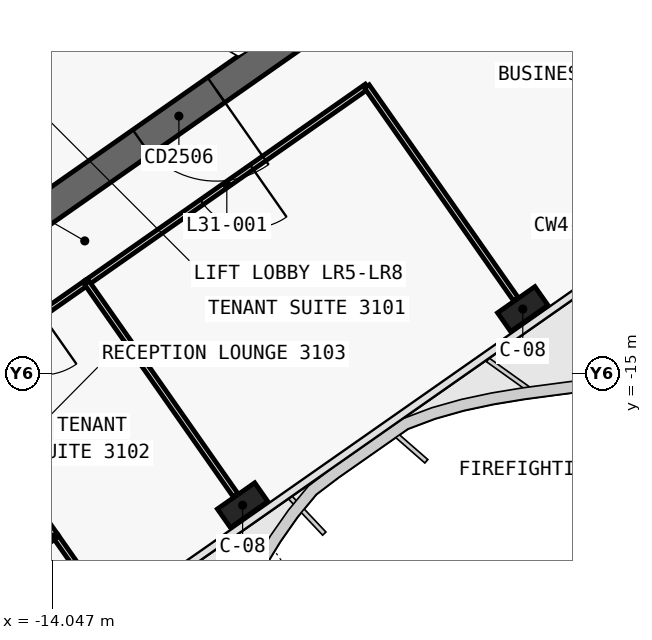
"""IFC4 building model, lengths in metres.
Left out: names, types, materials, properties, quantities, classifications, styles, units other than length and angle.
Written with IfcOpenShell. Run it as: python <this file> out.ifc"""

import sys

from ifc_helpers import new_model, si_unit, direction, frame, frame_2d, origin, origin_2d, place, context, subcontext, project, spatial, polyline, rectangle, outline, extrude, element, fill, save


model = new_model("IFC4")
c1 = context("Model", 3, precision=1e-05, world=origin(), true_north=direction((0.0, 1.0)))
c2 = subcontext(c1, "Body", "Model", "MODEL_VIEW")
j1 = project(units=[si_unit("LENGTHUNIT", "METRE"), si_unit("PLANEANGLEUNIT", "RADIAN")], contexts=[c1])
p1 = place(None, origin())
s1 = spatial("IfcSite", under=j1, at=p1, CompositionType="ELEMENT")
p2 = place(p1, origin())
s2 = spatial("IfcBuilding", under=s1, at=p2, CompositionType="ELEMENT")
p3 = place(p2, frame((0.0, 0.0, 139.8)))
s3 = spatial("IfcBuildingStorey", under=s2, at=p3, CompositionType="ELEMENT", Elevation=139.8)
p4 = place(p3, frame((0.029, 11.984, 0.0), z_axis=(0.0, 0.0, 1.0), x_axis=(-0.819151382952, -0.573577380837, 0.0)))
e1 = element("IfcWall", 1, at=p4, inside=s3, PredefinedType="SHEAR", context=c2, shape_type="SweptSolid", body=[
    extrude(outline(polyline([(33.898, 0.4), (0.56, 0.4), (-0.0, -0.4), (33.898, -0.4), (33.898, 0.4)])), origin(), (0.0, 0.0, 1.0), 3.9),
])
p5 = place(p3, frame((0.029, -0.712, 0.0), z_axis=(0.0, 0.0, 1.0), x_axis=(-0.819151758019, -0.573576845187, 0.0)))
e2 = element("IfcWall", 2, at=p5, inside=s3, PredefinedType="SHEAR", context=c2, shape_type="SweptSolid", body=[
    extrude(outline(polyline([(26.616, 0.4), (0.56, 0.4), (-0.0, -0.4), (26.616, -0.4), (26.616, 0.4)])), origin(), (0.0, 0.0, 1.0), 3.9),
])
p6 = place(p5, frame((2.966, 0.0, 0.0)))
e3 = element("IfcOpeningElement", 3, at=p6, cuts=e2, PredefinedType="OPENING", context=c2, shape_type="SweptSolid", body=[
    extrude(rectangle(XDim=2.4, YDim=2.1, at=frame_2d((1.2, 1.05))), frame((0.0, 0.41, 0.0), z_axis=(0.0, -1.0, 0.0), x_axis=(1.0, 0.0, 0.0)), (0.0, 0.0, 1.0), 0.82),
])
p7 = place(p5, frame((11.916, 0.0, 0.0)))
e4 = element("IfcOpeningElement", 4, at=p7, cuts=e2, PredefinedType="OPENING", context=c2, shape_type="SweptSolid", body=[
    extrude(rectangle(XDim=2.4, YDim=2.1, at=frame_2d((1.2, 1.05))), frame((0.0, 0.41, 0.0), z_axis=(0.0, -1.0, 0.0), x_axis=(1.0, 0.0, 0.0)), (0.0, 0.0, 1.0), 0.82),
])
p8 = place(p3, frame((-2.638, 3.768, 0.0), z_axis=(0.0, 0.0, 1.0), x_axis=(-0.81915267502, -0.573575535572, 0.0)))
e5 = element("IfcWall", 5, at=p8, inside=s3, PredefinedType="SHEAR", context=c2, shape_type="SweptSolid", body=[
    extrude(outline(polyline([(26.2, 0.2), (0.0, 0.2), (0.0, -0.2), (26.2, -0.2), (26.2, 0.2)])), origin(), (0.0, 0.0, 1.0), 3.9),
])
p9 = place(p8, frame((1.169, 0.0, 0.0)))
e6 = element("IfcOpeningElement", 6, at=p9, cuts=e5, PredefinedType="OPENING", context=c2, shape_type="SweptSolid", body=[
    extrude(rectangle(XDim=1.1, YDim=2.1, at=frame_2d((0.55, 1.05))), frame((0.0, 0.21, 0.0), z_axis=(0.0, -1.0, 0.0), x_axis=(1.0, 0.0, 0.0)), (0.0, 0.0, 1.0), 0.42),
])
p10 = place(p8, frame((3.206, 0.0, 0.0)))
e7 = element("IfcOpeningElement", 7, at=p10, cuts=e5, PredefinedType="OPENING", context=c2, shape_type="SweptSolid", body=[
    extrude(rectangle(XDim=1.1, YDim=2.1, at=frame_2d((0.55, 1.05))), frame((0.0, 0.21, 0.0), z_axis=(0.0, -1.0, 0.0), x_axis=(1.0, 0.0, 0.0)), (0.0, 0.0, 1.0), 0.42),
])
p11 = place(p8, frame((5.244, 0.0, 0.0)))
e8 = element("IfcOpeningElement", 8, at=p11, cuts=e5, PredefinedType="OPENING", context=c2, shape_type="SweptSolid", body=[
    extrude(rectangle(XDim=1.1, YDim=2.1, at=frame_2d((0.55, 1.05))), frame((0.0, 0.21, 0.0), z_axis=(0.0, -1.0, 0.0), x_axis=(1.0, 0.0, 0.0)), (0.0, 0.0, 1.0), 0.42),
])
p12 = place(p8, frame((7.281, 0.0, 0.0)))
e9 = element("IfcOpeningElement", 9, at=p12, cuts=e5, PredefinedType="OPENING", context=c2, shape_type="SweptSolid", body=[
    extrude(rectangle(XDim=1.1, YDim=2.1, at=frame_2d((0.55, 1.05))), frame((0.0, 0.21, 0.0), z_axis=(0.0, -1.0, 0.0), x_axis=(1.0, 0.0, 0.0)), (0.0, 0.0, 1.0), 0.42),
])
p13 = place(p8, frame((9.688, 0.0, 0.0)))
e10 = element("IfcOpeningElement", 10, at=p13, cuts=e5, PredefinedType="OPENING", context=c2, shape_type="SweptSolid", body=[
    extrude(rectangle(XDim=1.1, YDim=2.1, at=frame_2d((0.55, 1.05))), frame((0.0, 0.21, 0.0), z_axis=(0.0, -1.0, 0.0), x_axis=(1.0, 0.0, 0.0)), (0.0, 0.0, 1.0), 0.42),
])
p14 = place(p8, frame((11.863, 0.0, 0.0)))
e11 = element("IfcOpeningElement", 11, at=p14, cuts=e5, PredefinedType="OPENING", context=c2, shape_type="SweptSolid", body=[
    extrude(rectangle(XDim=1.1, YDim=2.1, at=frame_2d((0.55, 1.05))), frame((0.0, 0.21, 0.0), z_axis=(0.0, -1.0, 0.0), x_axis=(1.0, 0.0, 0.0)), (0.0, 0.0, 1.0), 0.42),
])
p15 = place(p8, frame((14.038, 0.0, 0.0)))
e12 = element("IfcOpeningElement", 12, at=p15, cuts=e5, PredefinedType="OPENING", context=c2, shape_type="SweptSolid", body=[
    extrude(rectangle(XDim=1.1, YDim=2.1, at=frame_2d((0.55, 1.05))), frame((0.0, 0.21, 0.0), z_axis=(0.0, -1.0, 0.0), x_axis=(1.0, 0.0, 0.0)), (0.0, 0.0, 1.0), 0.42),
])
p16 = place(p8, frame((16.212, 0.0, 0.0)))
e13 = element("IfcOpeningElement", 13, at=p16, cuts=e5, PredefinedType="OPENING", context=c2, shape_type="SweptSolid", body=[
    extrude(rectangle(XDim=1.1, YDim=2.1, at=frame_2d((0.55, 1.05))), frame((0.0, 0.21, 0.0), z_axis=(0.0, -1.0, 0.0), x_axis=(1.0, 0.0, 0.0)), (0.0, 0.0, 1.0), 0.42),
])
for number, where, z_axis, x_axis in (
    (14, (-1.665, -13.313, 0.0), (0.0, 0.0, 1.0), (-0.819, -0.574, 0.0)),
    (15, (-9.038, -18.475, 0.0), (0.0, 0.0, 1.0), (-0.819, -0.574, 0.0)),
):
    element("IfcColumn", number, at=place(p3, frame(where, z_axis=z_axis, x_axis=x_axis)), inside=s3, PredefinedType="COLUMN", context=c2, shape_type="SweptSolid", body=[
        extrude(rectangle(XDim=1.2, YDim=0.6, at=origin_2d()), origin(), (0.0, 0.0, 1.0), 3.9),
    ])
p17 = place(p3, frame((-5.766, -7.456, 0.0), z_axis=(0.0, 0.0, 1.0), x_axis=(-0.81915291695, -0.57357519006, 0.0)))
e16 = element("IfcWall", 16, at=p17, inside=s3, PredefinedType="PARTITIONING", context=c2, shape_type="SweptSolid", body=[
    extrude(rectangle(XDim=9.002, YDim=0.15, at=frame_2d((4.501, 0.0))), origin(), (0.0, 0.0, 1.0), 3.0),
])
p18 = place(p17, frame((3.701, 0.0, 0.0)))
e17 = element("IfcOpeningElement", 17, at=p18, cuts=e16, PredefinedType="OPENING", context=c2, shape_type="SweptSolid", body=[
    extrude(rectangle(XDim=1.6, YDim=2.1, at=frame_2d((0.8, 1.05))), frame((0.0, 0.085, 0.0), z_axis=(0.0, -1.0, 0.0), x_axis=(1.0, 0.0, 0.0)), (0.0, 0.0, 1.0), 0.17),
])
p19 = place(p3, frame((-13.137, -12.617, 0.0), z_axis=(0.0, 0.0, 1.0), x_axis=(-0.819147870025, -0.573582397772, 0.0)))
e18 = element("IfcWall", 18, at=p19, inside=s3, PredefinedType="PARTITIONING", context=c2, shape_type="SweptSolid", body=[
    extrude(rectangle(XDim=4.504, YDim=0.15, at=frame_2d((2.252, 0.0))), origin(), (0.0, 0.0, 1.0), 3.0),
])
p20 = place(p19, frame((1.452, 0.0, 0.0)))
e19 = element("IfcOpeningElement", 19, at=p20, cuts=e18, PredefinedType="OPENING", context=c2, shape_type="SweptSolid", body=[
    extrude(rectangle(XDim=1.6, YDim=2.1, at=frame_2d((0.8, 1.05))), frame((0.0, 0.085, 0.0), z_axis=(0.0, -1.0, 0.0), x_axis=(1.0, 0.0, 0.0)), (0.0, 0.0, 1.0), 0.17),
])
p21 = place(p3, frame((-1.849, -13.051, 0.0), z_axis=(0.0, 0.0, 1.0), x_axis=(-0.57357985571, 0.819149650018, 0.0)))
e20 = element("IfcWall", 20, at=p21, inside=s3, PredefinedType="PARTITIONING", context=c2, shape_type="SweptSolid", body=[
    extrude(rectangle(XDim=6.832, YDim=0.15, at=frame_2d((3.416, 0.0))), origin(), (0.0, 0.0, 1.0), 3.0),
])
p22 = place(p3, frame((-9.221, -18.213, 0.0), z_axis=(0.0, 0.0, 1.0), x_axis=(-0.573560698343, 0.819163063936, 0.0)))
e21 = element("IfcWall", 21, at=p22, inside=s3, PredefinedType="PARTITIONING", context=c2, shape_type="SweptSolid", body=[
    extrude(rectangle(XDim=6.83, YDim=0.15, at=frame_2d((3.415, 0.0))), origin(), (0.0, 0.0, 1.0), 3.0),
])
p23 = place(p3, frame((-12.523, -21.343, 0.0), z_axis=(0.0, 0.0, 1.0), x_axis=(-0.573501652684, 0.819204403289, 0.0)))
e22 = element("IfcWall", 22, at=p23, inside=s3, PredefinedType="PARTITIONING", context=c2, shape_type="SweptSolid", body=[
    extrude(rectangle(XDim=2.501, YDim=0.15, at=frame_2d((1.25, 0.0))), origin(), (0.0, 0.0, 1.0), 2.9),
])
p24 = place(p3, frame((-13.956, -19.296, 0.0), z_axis=(0.0, 0.0, 1.0), x_axis=(-0.573613022702, 0.819126425033, 0.0)))
e23 = element("IfcWall", 23, at=p24, inside=s3, PredefinedType="PARTITIONING", context=c2, shape_type="SweptSolid", body=[
    extrude(rectangle(XDim=5.002, YDim=0.15, at=frame_2d((2.501, 0.0))), origin(), (0.0, 0.0, 1.0), 3.62),
])
p25 = place(p3, frame((-13.957, -19.296, 0.0), z_axis=(0.0, 0.0, 1.0), x_axis=(-0.819149710902, -0.573579768758, 0.0)))
e24 = element("IfcWall", 24, at=p25, inside=s3, PredefinedType="PARTITIONING", context=c2, shape_type="SweptSolid", body=[
    extrude(rectangle(XDim=6.0, YDim=0.1, at=frame_2d((3.0, 0.0))), origin(), (0.0, 0.0, 1.0), 3.0),
])
p26 = place(p25, frame((2.55, 0.0, 0.0)))
e25 = element("IfcOpeningElement", 25, at=p26, cuts=e24, PredefinedType="OPENING", context=c2, shape_type="SweptSolid", body=[
    extrude(rectangle(XDim=0.9, YDim=2.1, at=frame_2d((0.45, 1.05))), frame((0.0, 0.06, 0.0), z_axis=(0.0, -1.0, 0.0), x_axis=(1.0, 0.0, 0.0)), (0.0, 0.0, 1.0), 0.12),
])
p27 = place(p7, origin())
e26 = element("IfcDoor", 26, at=p27, inside=s3, OperationType="DOUBLE_DOOR_SINGLE_SWING", PredefinedType="DOOR", context=c2, shape_type="SweptSolid", body=[
    extrude(rectangle(XDim=2.4, YDim=2.1, at=frame_2d((1.2, 1.05))), frame((0.0, 0.025, 0.0), z_axis=(0.0, -1.0, 0.0), x_axis=(1.0, 0.0, 0.0)), (0.0, 0.0, 1.0), 0.05),
])
fill(e4, e26)
p28 = place(p18, origin())
e27 = element("IfcDoor", 27, at=p28, inside=s3, OperationType="DOUBLE_DOOR_SINGLE_SWING", PredefinedType="DOOR", context=c2, shape_type="SweptSolid", body=[
    extrude(rectangle(XDim=1.6, YDim=2.1, at=frame_2d((0.8, 1.05))), frame((0.0, 0.025, 0.0), z_axis=(0.0, -1.0, 0.0), x_axis=(1.0, 0.0, 0.0)), (0.0, 0.0, 1.0), 0.05),
])
fill(e17, e27)
save(model, sys.argv[1])
